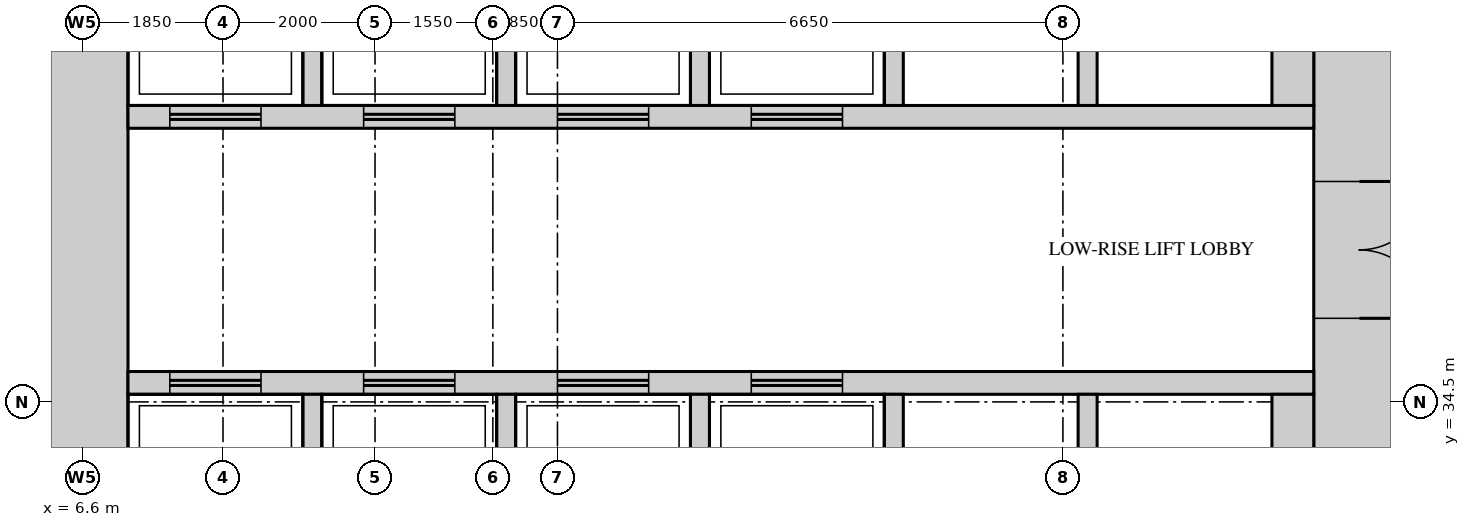
"""IFC4 building model, lengths in metres.
Left out: names, types, materials, properties, quantities, classifications, styles, units other than length and angle.
Written with IfcOpenShell. Run it as: python <this file> out.ifc"""

import sys

from ifc_helpers import new_model, si_unit, direction, frame, frame_2d, origin, place, context, subcontext, project, spatial, rectangle, extrude, source, transform, mapped, element, fill, save


model = new_model("IFC4")
c1 = context("Model", 3, precision=1e-05, world=origin(), true_north=direction((0.0, 1.0)))
c2 = subcontext(c1, "Body", "Model", "MODEL_VIEW")
j1 = project(units=[si_unit("LENGTHUNIT", "METRE"), si_unit("PLANEANGLEUNIT", "RADIAN")], contexts=[c1])
p1 = place(None, origin())
s1 = spatial("IfcSite", under=j1, at=p1, CompositionType="ELEMENT")
p2 = place(p1, origin())
s2 = spatial("IfcBuilding", under=s1, at=p2, CompositionType="ELEMENT")
p3 = place(p2, frame((0.0, 0.0, 42.0)))
s3 = spatial("IfcBuildingStorey", under=s2, at=p3, CompositionType="ELEMENT", Elevation=42.0)
m1 = source(origin(), c2, "Body", "SweptSolid", [
    extrude(rectangle(XDim=27.6, YDim=1.2, at=frame_2d((13.8, 0.0))), origin(), (0.0, 0.0, 1.0), 4.2),
])
p4 = place(p3, frame((23.4, 13.2, 0.0), z_axis=(0.0, 0.0, 1.0), x_axis=(0.0, 1.0, 0.0)))
e1 = element("IfcWall", 1, at=p4, inside=s3, PredefinedType="SHEAR", context=c2, shape_type="MappedRepresentation", body=[
    mapped(m1, transform((0.0, 0.0, 0.0))),
])
m2 = source(origin(), c2, "Body", "SweptSolid", [
    extrude(rectangle(XDim=1.8, YDim=2.1, at=frame_2d((0.9, 1.05))), frame((0.0, 0.61, 0.0), z_axis=(0.0, -1.0, 0.0), x_axis=(1.0, 0.0, 0.0)), (0.0, 0.0, 1.0), 1.22),
])
p5 = place(p4, frame((22.4, 0.0, 0.0)))
e2 = element("IfcOpeningElement", 2, at=p5, cuts=e1, PredefinedType="OPENING", context=c2, shape_type="MappedRepresentation", body=[
    mapped(m2, transform((0.0, 0.0, 0.0))),
])
m3 = source(origin(), c2, "Body", "SweptSolid", [
    extrude(rectangle(XDim=1.2, YDim=2.1, at=frame_2d((0.6, 1.05))), frame((0.0, 0.61, 0.0), z_axis=(0.0, -1.0, 0.0), x_axis=(1.0, 0.0, 0.0)), (0.0, 0.0, 1.0), 1.22),
])
p6 = place(p4, frame((13.65, 0.0, 0.0)))
e3 = element("IfcOpeningElement", 3, at=p6, cuts=e1, PredefinedType="OPENING", context=c2, shape_type="MappedRepresentation", body=[
    mapped(m3, transform((0.0, 0.0, 0.0))),
])
m4 = source(origin(), c2, "Body", "SweptSolid", [
    extrude(rectangle(XDim=0.9, YDim=2.1, at=frame_2d((0.45, 1.05))), frame((0.0, 0.61, 0.0), z_axis=(0.0, -1.0, 0.0), x_axis=(1.0, 0.0, 0.0)), (0.0, 0.0, 1.0), 1.22),
])
p7 = place(p4, frame((1.95, 0.0, 0.0)))
e4 = element("IfcOpeningElement", 4, at=p7, cuts=e1, PredefinedType="OPENING", context=c2, shape_type="MappedRepresentation", body=[
    mapped(m4, transform((0.0, 0.0, 0.0))),
])
p8 = place(p4, frame((6.8, 0.0, 0.0)))
e5 = element("IfcOpeningElement", 5, at=p8, cuts=e1, PredefinedType="OPENING", context=c2, shape_type="MappedRepresentation", body=[
    mapped(m4, transform((0.0, 0.0, 0.0))),
])
p9 = place(p3, frame((6.6, 13.2, 0.0), z_axis=(0.0, 0.0, 1.0), x_axis=(0.0, 1.0, 0.0)))
e6 = element("IfcWall", 6, at=p9, inside=s3, PredefinedType="SHEAR", context=c2, shape_type="MappedRepresentation", body=[
    mapped(m1, transform((0.0, 0.0, 0.0))),
])
m5 = source(origin(), c2, "Body", "SweptSolid", [
    extrude(rectangle(XDim=15.6, YDim=0.3, at=frame_2d((7.8, 0.0))), origin(), (0.0, 0.0, 1.0), 4.2),
])
p10 = place(p3, frame((7.2, 38.25, 0.0), z_axis=(0.0, 0.0, 1.0), x_axis=(1.0, 0.0, 0.0)))
e7 = element("IfcWall", 7, at=p10, inside=s3, PredefinedType="STANDARD", context=c2, shape_type="MappedRepresentation", body=[
    mapped(m5, transform((0.0, 0.0, 0.0))),
])
m6 = source(origin(), c2, "Body", "SweptSolid", [
    extrude(rectangle(XDim=1.2, YDim=2.1, at=frame_2d((0.6, 1.05))), frame((0.0, 0.16, 0.0), z_axis=(0.0, -1.0, 0.0), x_axis=(1.0, 0.0, 0.0)), (0.0, 0.0, 1.0), 0.32),
])
p11 = place(p10, frame((0.55, 0.0, 0.0)))
e8 = element("IfcOpeningElement", 8, at=p11, cuts=e7, PredefinedType="OPENING", context=c2, shape_type="MappedRepresentation", body=[
    mapped(m6, transform((0.0, 0.0, 0.0))),
])
p12 = place(p10, frame((3.1, 0.0, 0.0)))
e9 = element("IfcOpeningElement", 9, at=p12, cuts=e7, PredefinedType="OPENING", context=c2, shape_type="MappedRepresentation", body=[
    mapped(m6, transform((0.0, 0.0, 0.0))),
])
p13 = place(p10, frame((5.65, 0.0, 0.0)))
e10 = element("IfcOpeningElement", 10, at=p13, cuts=e7, PredefinedType="OPENING", context=c2, shape_type="MappedRepresentation", body=[
    mapped(m6, transform((0.0, 0.0, 0.0))),
])
p14 = place(p10, frame((8.2, 0.0, 0.0)))
e11 = element("IfcOpeningElement", 11, at=p14, cuts=e7, PredefinedType="OPENING", context=c2, shape_type="MappedRepresentation", body=[
    mapped(m6, transform((0.0, 0.0, 0.0))),
])
p15 = place(p3, frame((7.2, 34.75, 0.0), z_axis=(0.0, 0.0, 1.0), x_axis=(1.0, 0.0, 0.0)))
e12 = element("IfcWall", 12, at=p15, inside=s3, PredefinedType="STANDARD", context=c2, shape_type="MappedRepresentation", body=[
    mapped(m5, transform((0.0, 0.0, 0.0))),
])
p16 = place(p15, frame((0.55, 0.0, 0.0)))
e13 = element("IfcOpeningElement", 13, at=p16, cuts=e12, PredefinedType="OPENING", context=c2, shape_type="MappedRepresentation", body=[
    mapped(m6, transform((0.0, 0.0, 0.0))),
])
p17 = place(p15, frame((3.1, 0.0, 0.0)))
e14 = element("IfcOpeningElement", 14, at=p17, cuts=e12, PredefinedType="OPENING", context=c2, shape_type="MappedRepresentation", body=[
    mapped(m6, transform((0.0, 0.0, 0.0))),
])
p18 = place(p15, frame((5.65, 0.0, 0.0)))
e15 = element("IfcOpeningElement", 15, at=p18, cuts=e12, PredefinedType="OPENING", context=c2, shape_type="MappedRepresentation", body=[
    mapped(m6, transform((0.0, 0.0, 0.0))),
])
p19 = place(p15, frame((8.2, 0.0, 0.0)))
e16 = element("IfcOpeningElement", 16, at=p19, cuts=e12, PredefinedType="OPENING", context=c2, shape_type="MappedRepresentation", body=[
    mapped(m6, transform((0.0, 0.0, 0.0))),
])
m7 = source(origin(), c2, "Body", "SweptSolid", [
    extrude(rectangle(XDim=2.4, YDim=0.25, at=frame_2d((1.2, 0.0))), origin(), (0.0, 0.0, 1.0), 4.2),
])
for number, where, z_axis, x_axis in (
    (17, (9.625, 38.4, 0.0), (0.0, 0.0, 1.0), (0.0, 1.0, 0.0)),
    (18, (12.175, 38.4, 0.0), (0.0, 0.0, 1.0), (0.0, 1.0, 0.0)),
    (19, (14.725, 38.4, 0.0), (0.0, 0.0, 1.0), (0.0, 1.0, 0.0)),
    (20, (17.275, 38.4, 0.0), (0.0, 0.0, 1.0), (0.0, 1.0, 0.0)),
    (21, (19.825, 38.4, 0.0), (0.0, 0.0, 1.0), (0.0, 1.0, 0.0)),
):
    element("IfcWall", number, at=place(p3, frame(where, z_axis=z_axis, x_axis=x_axis)), inside=s3, PredefinedType="STANDARD", context=c2, shape_type="MappedRepresentation", body=[
        mapped(m7, transform((0.0, 0.0, 0.0))),
    ])
m8 = source(origin(), c2, "Body", "SweptSolid", [
    extrude(rectangle(XDim=2.4, YDim=0.55, at=frame_2d((1.2, 0.0))), origin(), (0.0, 0.0, 1.0), 4.2),
])
p20 = place(p3, frame((22.525, 38.4, 0.0), z_axis=(0.0, 0.0, 1.0), x_axis=(0.0, 1.0, 0.0)))
e22 = element("IfcWall", 22, at=p20, inside=s3, PredefinedType="STANDARD", context=c2, shape_type="MappedRepresentation", body=[
    mapped(m8, transform((0.0, 0.0, 0.0))),
])
for number, where, z_axis, x_axis in (
    (23, (9.625, 32.2, 0.0), (0.0, 0.0, 1.0), (0.0, 1.0, 0.0)),
    (24, (12.175, 32.2, 0.0), (0.0, 0.0, 1.0), (0.0, 1.0, 0.0)),
    (25, (14.725, 32.2, 0.0), (0.0, 0.0, 1.0), (0.0, 1.0, 0.0)),
    (26, (17.275, 32.2, 0.0), (0.0, 0.0, 1.0), (0.0, 1.0, 0.0)),
    (27, (19.825, 32.2, 0.0), (0.0, 0.0, 1.0), (0.0, 1.0, 0.0)),
):
    element("IfcWall", number, at=place(p3, frame(where, z_axis=z_axis, x_axis=x_axis)), inside=s3, PredefinedType="STANDARD", context=c2, shape_type="MappedRepresentation", body=[
        mapped(m7, transform((0.0, 0.0, 0.0))),
    ])
p21 = place(p3, frame((22.525, 32.2, 0.0), z_axis=(0.0, 0.0, 1.0), x_axis=(0.0, 1.0, 0.0)))
e28 = element("IfcWall", 28, at=p21, inside=s3, PredefinedType="STANDARD", context=c2, shape_type="MappedRepresentation", body=[
    mapped(m8, transform((0.0, 0.0, 0.0))),
])
m9 = source(origin(), c2, "Body", "SweptSolid", [
    extrude(rectangle(XDim=1.8, YDim=2.1, at=frame_2d((0.9, 1.05))), frame((0.0, 0.55, 0.0), z_axis=(0.0, -1.0, 0.0), x_axis=(1.0, 0.0, 0.0)), (0.0, 0.0, 1.0), 1.1),
])
p22 = place(p5, origin())
e29 = element("IfcDoor", 29, at=p22, inside=s3, OperationType="DOUBLE_DOOR_SINGLE_SWING", PredefinedType="DOOR", context=c2, shape_type="MappedRepresentation", body=[
    mapped(m9, transform((0.0, 0.0, 0.0))),
])
fill(e2, e29)
m10 = source(origin(), c2, "Body", "SweptSolid", [
    extrude(rectangle(XDim=1.2, YDim=2.1, at=frame_2d((0.6, 1.05))), frame((0.0, 0.025, 0.0), z_axis=(0.0, -1.0, 0.0), x_axis=(1.0, 0.0, 0.0)), (0.0, 0.0, 1.0), 0.05),
])
p23 = place(p16, origin())
e30 = element("IfcDoor", 30, at=p23, inside=s3, OperationType="DOUBLE_DOOR_SLIDING", PredefinedType="DOOR", context=c2, shape_type="MappedRepresentation", body=[
    mapped(m10, transform((0.0, 0.0, 0.0))),
])
fill(e13, e30)
p24 = place(p17, origin())
e31 = element("IfcDoor", 31, at=p24, inside=s3, OperationType="DOUBLE_DOOR_SLIDING", PredefinedType="DOOR", context=c2, shape_type="MappedRepresentation", body=[
    mapped(m10, transform((0.0, 0.0, 0.0))),
])
fill(e14, e31)
p25 = place(p18, origin())
e32 = element("IfcDoor", 32, at=p25, inside=s3, OperationType="DOUBLE_DOOR_SLIDING", PredefinedType="DOOR", context=c2, shape_type="MappedRepresentation", body=[
    mapped(m10, transform((0.0, 0.0, 0.0))),
])
fill(e15, e32)
p26 = place(p19, origin())
e33 = element("IfcDoor", 33, at=p26, inside=s3, OperationType="DOUBLE_DOOR_SLIDING", PredefinedType="DOOR", context=c2, shape_type="MappedRepresentation", body=[
    mapped(m10, transform((0.0, 0.0, 0.0))),
])
fill(e16, e33)
p27 = place(p11, origin())
e34 = element("IfcDoor", 34, at=p27, inside=s3, OperationType="DOUBLE_DOOR_SLIDING", PredefinedType="DOOR", context=c2, shape_type="MappedRepresentation", body=[
    mapped(m10, transform((0.0, 0.0, 0.0))),
])
fill(e8, e34)
p28 = place(p12, origin())
e35 = element("IfcDoor", 35, at=p28, inside=s3, OperationType="DOUBLE_DOOR_SLIDING", PredefinedType="DOOR", context=c2, shape_type="MappedRepresentation", body=[
    mapped(m10, transform((0.0, 0.0, 0.0))),
])
fill(e9, e35)
p29 = place(p13, origin())
e36 = element("IfcDoor", 36, at=p29, inside=s3, OperationType="DOUBLE_DOOR_SLIDING", PredefinedType="DOOR", context=c2, shape_type="MappedRepresentation", body=[
    mapped(m10, transform((0.0, 0.0, 0.0))),
])
fill(e10, e36)
p30 = place(p14, origin())
e37 = element("IfcDoor", 37, at=p30, inside=s3, OperationType="DOUBLE_DOOR_SLIDING", PredefinedType="DOOR", context=c2, shape_type="MappedRepresentation", body=[
    mapped(m10, transform((0.0, 0.0, 0.0))),
])
fill(e11, e37)
save(model, sys.argv[1])
